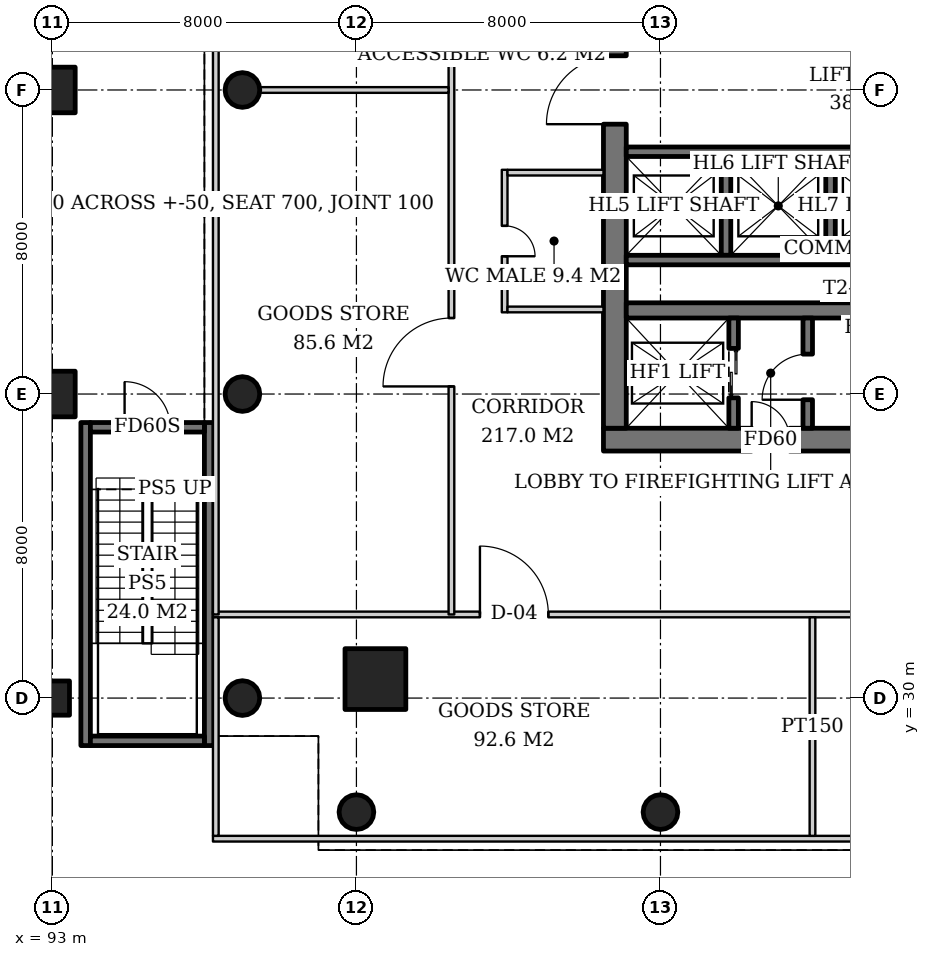
"""IFC4 building model, lengths in metres.
Left out: names, types, materials, properties, quantities, classifications, styles, units other than length and angle.
Written with IfcOpenShell. Run it as: python <this file> out.ifc"""

import sys

from ifc_helpers import new_model, si_unit, direction, frame, frame_2d, origin, origin_2d, place, context, subcontext, project, spatial, rectangle, hollow_circle, extrude, element, fill, save


model = new_model("IFC4")
c1 = context("Model", 3, precision=1e-05, world=origin(), true_north=direction((0.0, 1.0)))
c2 = subcontext(c1, "Body", "Model", "MODEL_VIEW")
j1 = project(units=[si_unit("LENGTHUNIT", "METRE"), si_unit("PLANEANGLEUNIT", "RADIAN")], contexts=[c1])
p1 = place(None, origin())
s1 = spatial("IfcSite", under=j1, at=p1, CompositionType="ELEMENT")
p2 = place(p1, origin())
s2 = spatial("IfcBuilding", under=s1, at=p2, CompositionType="ELEMENT")
p3 = place(p2, frame((0.0, 0.0, 6.0)))
s3 = spatial("IfcBuildingStorey", under=s2, at=p3, CompositionType="ELEMENT", Elevation=6.0)
p4 = place(p3, frame((93.0, 30.0, 0.0), z_axis=(0.0, 0.0, 1.0), x_axis=(1.0, 0.0, 0.0)))
e1 = element("IfcColumn", 1, at=p4, inside=s3, PredefinedType="COLUMN", context=c2, shape_type="SweptSolid", body=[
    extrude(rectangle(XDim=0.9, YDim=0.9, at=origin_2d()), origin(), (0.0, 0.0, 1.0), 5.0),
])
for number, where, z_axis, x_axis in (
    (2, (93.0, 38.0, 0.0), (0.0, 0.0, 1.0), (1.0, 0.0, 0.0)),
    (3, (93.0, 46.0, 0.0), (0.0, 0.0, 1.0), (1.0, 0.0, 0.0)),
):
    element("IfcColumn", number, at=place(p3, frame(where, z_axis=z_axis, x_axis=x_axis)), inside=s3, PredefinedType="COLUMN", context=c2, shape_type="SweptSolid", body=[
        extrude(rectangle(XDim=1.2, YDim=1.2, at=origin_2d()), origin(), (0.0, 0.0, 1.0), 5.0),
    ])
p5 = place(p3, frame((101.5, 30.5, 0.0), z_axis=(0.0, 0.0, 1.0), x_axis=(1.0, 0.0, 0.0)))
e4 = element("IfcColumn", 4, at=p5, inside=s3, PredefinedType="COLUMN", context=c2, shape_type="SweptSolid", body=[
    extrude(rectangle(XDim=1.6, YDim=1.6, at=origin_2d()), origin(), (0.0, 0.0, 1.0), 5.0),
])
for number, where, z_axis, x_axis in (
    (5, (98.0, 30.0, 0.0), (0.0, 0.0, 1.0), (1.0, 0.0, 0.0)),
    (6, (98.0, 46.0, 0.0), (0.0, 0.0, 1.0), (1.0, 0.0, 0.0)),
    (7, (98.0, 38.0, 0.0), (0.0, 0.0, 1.0), (1.0, 0.0, 0.0)),
    (8, (101.0, 27.0, 0.0), (0.0, 0.0, 1.0), (1.0, 0.0, 0.0)),
    (9, (109.0, 27.0, 0.0), (0.0, 0.0, 1.0), (1.0, 0.0, 0.0)),
):
    element("IfcColumn", number, at=place(p3, frame(where, z_axis=z_axis, x_axis=x_axis)), inside=s3, PredefinedType="COLUMN", context=c2, shape_type="SweptSolid", body=[
        extrude(hollow_circle(Radius=0.457, WallThickness=0.03, at=origin_2d()), origin(), (0.0, 0.0, 1.0), 5.0),
    ])
p6 = place(p3, frame((107.5, 36.8, 0.0), z_axis=(0.0, 0.0, 1.0), x_axis=(1.0, 0.0, 0.0)))
e10 = element("IfcWall", 10, at=p6, inside=s3, PredefinedType="SHEAR", context=c2, shape_type="SweptSolid", body=[
    extrude(rectangle(XDim=19.0, YDim=0.6, at=frame_2d((9.5, 0.0))), origin(), (0.0, 0.0, 1.0), 5.0),
])
p7 = place(p6, frame((3.9, 0.0, 0.0)))
e11 = element("IfcOpeningElement", 11, at=p7, cuts=e10, PredefinedType="OPENING", context=c2, shape_type="SweptSolid", body=[
    extrude(rectangle(XDim=1.0, YDim=2.1, at=frame_2d((0.5, 1.05))), frame((0.0, 0.31, 0.0), z_axis=(0.0, -1.0, 0.0), x_axis=(1.0, 0.0, 0.0)), (0.0, 0.0, 1.0), 0.62),
])
p8 = place(p6, frame((14.153, 0.0, 0.0)))
e12 = element("IfcOpeningElement", 12, at=p8, cuts=e10, PredefinedType="OPENING", context=c2, shape_type="SweptSolid", body=[
    extrude(rectangle(XDim=1.0, YDim=2.1, at=frame_2d((0.5, 1.05))), frame((0.0, 0.31, 0.0), z_axis=(0.0, -1.0, 0.0), x_axis=(1.0, 0.0, 0.0)), (0.0, 0.0, 1.0), 0.62),
])
p9 = place(p6, frame((16.2, 0.0, 0.0)))
e13 = element("IfcOpeningElement", 13, at=p9, cuts=e10, PredefinedType="OPENING", context=c2, shape_type="SweptSolid", body=[
    extrude(rectangle(XDim=1.0, YDim=2.1, at=frame_2d((0.5, 1.05))), frame((0.0, 0.31, 0.0), z_axis=(0.0, -1.0, 0.0), x_axis=(1.0, 0.0, 0.0)), (0.0, 0.0, 1.0), 0.62),
])
p10 = place(p3, frame((107.8, 37.1, 0.0), z_axis=(0.0, 0.0, 1.0), x_axis=(0.0, 1.0, 0.0)))
e14 = element("IfcWall", 14, at=p10, inside=s3, PredefinedType="SHEAR", context=c2, shape_type="SweptSolid", body=[
    extrude(rectangle(XDim=17.8, YDim=0.6, at=frame_2d((8.9, 0.0))), origin(), (0.0, 0.0, 1.0), 5.0),
])
p11 = place(p10, frame((8.0, 0.0, 0.0)))
e15 = element("IfcOpeningElement", 15, at=p11, cuts=e14, PredefinedType="OPENING", context=c2, shape_type="SweptSolid", body=[
    extrude(rectangle(XDim=1.8, YDim=2.4, at=frame_2d((0.9, 1.2))), frame((0.0, 0.31, 0.0), z_axis=(0.0, -1.0, 0.0), x_axis=(1.0, 0.0, 0.0)), (0.0, 0.0, 1.0), 0.62),
])
p12 = place(p3, frame((108.1, 40.2, 0.0), z_axis=(0.0, 0.0, 1.0), x_axis=(1.0, 0.0, 0.0)))
e16 = element("IfcWall", 16, at=p12, inside=s3, PredefinedType="SHEAR", context=c2, shape_type="SweptSolid", body=[
    extrude(rectangle(XDim=17.8, YDim=0.4, at=frame_2d((8.9, 0.0))), origin(), (0.0, 0.0, 1.0), 5.0),
])
p13 = place(p3, frame((93.0, 43.0, 3.11), z_axis=(0.0, 0.0, 1.0), x_axis=(1.0, 0.0, 0.0)))
e17 = element("IfcColumn", 17, at=p13, inside=s3, PredefinedType="COLUMN", context=c2, shape_type="SweptSolid", body=[
    extrude(rectangle(XDim=0.3, YDim=0.4, at=origin_2d()), origin(), (0.0, 0.0, 1.0), 1.0),
])
p14 = place(p3, frame((110.925, 37.1, 0.0), z_axis=(0.0, 0.0, 1.0), x_axis=(0.0, 1.0, 0.0)))
e18 = element("IfcWall", 18, at=p14, inside=s3, PredefinedType="SHEAR", context=c2, shape_type="SweptSolid", body=[
    extrude(rectangle(XDim=2.9, YDim=0.25, at=frame_2d((1.45, 0.0))), origin(), (0.0, 0.0, 1.0), 5.0),
])
p15 = place(p14, frame((0.8, 0.0, 0.0)))
e19 = element("IfcOpeningElement", 19, at=p15, cuts=e18, PredefinedType="OPENING", context=c2, shape_type="SweptSolid", body=[
    extrude(rectangle(XDim=1.3, YDim=2.2, at=frame_2d((0.65, 1.1))), frame((0.0, 0.135, 0.0), z_axis=(0.0, -1.0, 0.0), x_axis=(1.0, 0.0, 0.0)), (0.0, 0.0, 1.0), 0.27),
])
p16 = place(p3, frame((112.875, 37.1, 0.0), z_axis=(0.0, 0.0, 1.0), x_axis=(0.0, 1.0, 0.0)))
e20 = element("IfcWall", 20, at=p16, inside=s3, PredefinedType="SHEAR", context=c2, shape_type="SweptSolid", body=[
    extrude(rectangle(XDim=2.9, YDim=0.25, at=frame_2d((1.45, 0.0))), origin(), (0.0, 0.0, 1.0), 5.0),
])
p17 = place(p16, frame((0.75, 0.0, 0.0)))
e21 = element("IfcOpeningElement", 21, at=p17, cuts=e20, PredefinedType="OPENING", context=c2, shape_type="SweptSolid", body=[
    extrude(rectangle(XDim=1.2, YDim=2.1, at=frame_2d((0.6, 1.05))), frame((0.0, 0.135, 0.0), z_axis=(0.0, -1.0, 0.0), x_axis=(1.0, 0.0, 0.0)), (0.0, 0.0, 1.0), 0.27),
])
for number, where, z_axis, x_axis in (
    (22, (110.725, 44.25, 0.0), (0.0, 0.0, 1.0), (0.0, -1.0, 0.0)),
    (23, (113.475, 44.25, 0.0), (0.0, 0.0, 1.0), (0.0, -1.0, 0.0)),
):
    element("IfcWall", number, at=place(p3, frame(where, z_axis=z_axis, x_axis=x_axis)), inside=s3, PredefinedType="SHEAR", context=c2, shape_type="SweptSolid", body=[
        extrude(rectangle(XDim=2.6, YDim=0.25, at=frame_2d((1.3, 0.0))), origin(), (0.0, 0.0, 1.0), 5.0),
    ])
p18 = place(p3, frame((108.1, 41.525, 0.0), z_axis=(0.0, 0.0, 1.0), x_axis=(1.0, 0.0, 0.0)))
e24 = element("IfcWall", 24, at=p18, inside=s3, PredefinedType="SHEAR", context=c2, shape_type="SweptSolid", body=[
    extrude(rectangle(XDim=11.0, YDim=0.25, at=frame_2d((5.5, 0.0))), origin(), (0.0, 0.0, 1.0), 5.0),
])
p19 = place(p3, frame((108.1, 44.375, 0.0), z_axis=(0.0, 0.0, 1.0), x_axis=(1.0, 0.0, 0.0)))
e25 = element("IfcWall", 25, at=p19, inside=s3, PredefinedType="SHEAR", context=c2, shape_type="SweptSolid", body=[
    extrude(rectangle(XDim=12.83, YDim=0.25, at=frame_2d((6.415, 0.0))), origin(), (0.0, 0.0, 1.0), 5.0),
])
p20 = place(p19, frame((9.0, 0.0, 0.0)))
e26 = element("IfcOpeningElement", 26, at=p20, cuts=e25, PredefinedType="OPENING", context=c2, shape_type="SweptSolid", body=[
    extrude(rectangle(XDim=1.0, YDim=2.1, at=frame_2d((0.5, 1.05))), frame((0.0, 0.135, 0.0), z_axis=(0.0, -1.0, 0.0), x_axis=(1.0, 0.0, 0.0)), (0.0, 0.0, 1.0), 0.27),
])
p21 = place(p19, frame((11.515, 0.0, 0.0)))
e27 = element("IfcOpeningElement", 27, at=p21, cuts=e25, PredefinedType="OPENING", context=c2, shape_type="SweptSolid", body=[
    extrude(rectangle(XDim=0.8, YDim=2.0, at=frame_2d((0.4, 1.0))), frame((0.0, 0.135, 0.0), z_axis=(0.0, -1.0, 0.0), x_axis=(1.0, 0.0, 0.0)), (0.0, 0.0, 1.0), 0.27),
])
for number, where, z_axis, x_axis in (
    (28, (93.875, 28.75, 0.0), (0.0, 0.0, 1.0), (0.0, 1.0, 0.0)),
    (29, (97.125, 28.75, 0.0), (0.0, 0.0, 1.0), (0.0, 1.0, 0.0)),
):
    element("IfcWall", number, at=place(p3, frame(where, z_axis=z_axis, x_axis=x_axis)), inside=s3, PredefinedType="SOLIDWALL", context=c2, shape_type="SweptSolid", body=[
        extrude(rectangle(XDim=8.5, YDim=0.25, at=frame_2d((4.25, 0.0))), origin(), (0.0, 0.0, 1.0), 4.7),
    ])
p22 = place(p3, frame((94.0, 28.875, 0.0), z_axis=(0.0, 0.0, 1.0), x_axis=(1.0, 0.0, 0.0)))
e30 = element("IfcWall", 30, at=p22, inside=s3, PredefinedType="SOLIDWALL", context=c2, shape_type="SweptSolid", body=[
    extrude(rectangle(XDim=3.0, YDim=0.25, at=frame_2d((1.5, 0.0))), origin(), (0.0, 0.0, 1.0), 4.7),
])
p23 = place(p3, frame((94.0, 37.125, 0.0), z_axis=(0.0, 0.0, 1.0), x_axis=(1.0, 0.0, 0.0)))
e31 = element("IfcWall", 31, at=p23, inside=s3, PredefinedType="SOLIDWALL", context=c2, shape_type="SweptSolid", body=[
    extrude(rectangle(XDim=3.0, YDim=0.25, at=frame_2d((1.5, 0.0))), origin(), (0.0, 0.0, 1.0), 4.7),
])
p24 = place(p23, frame((0.9, 0.0, 0.0)))
e32 = element("IfcOpeningElement", 32, at=p24, cuts=e31, PredefinedType="OPENING", context=c2, shape_type="SweptSolid", body=[
    extrude(rectangle(XDim=1.2, YDim=2.1, at=frame_2d((0.6, 1.05))), frame((0.0, 0.135, 0.0), z_axis=(0.0, -1.0, 0.0), x_axis=(1.0, 0.0, 0.0)), (0.0, 0.0, 1.0), 0.27),
])
p25 = place(p3, frame((104.9, 43.9, 0.0), z_axis=(0.0, 0.0, 1.0), x_axis=(0.0, -1.0, 0.0)))
e33 = element("IfcWall", 33, at=p25, inside=s3, PredefinedType="PARTITIONING", context=c2, shape_type="SweptSolid", body=[
    extrude(rectangle(XDim=3.75, YDim=0.15, at=frame_2d((1.875, 0.0))), origin(), (0.0, 0.0, 1.0), 3.947),
])
p26 = place(p25, frame((1.475, 0.0, 0.0)))
e34 = element("IfcOpeningElement", 34, at=p26, cuts=e33, PredefinedType="OPENING", context=c2, shape_type="SweptSolid", body=[
    extrude(rectangle(XDim=0.8, YDim=2.1, at=frame_2d((0.4, 1.05))), frame((0.0, 0.085, 0.0), z_axis=(0.0, -1.0, 0.0), x_axis=(1.0, 0.0, 0.0)), (0.0, 0.0, 1.0), 0.17),
])
for number, where, z_axis, x_axis in (
    (35, (104.975, 43.825, 0.0), (0.0, 0.0, 1.0), (1.0, 0.0, 0.0)),
    (36, (104.975, 40.225, 0.0), (0.0, 0.0, 1.0), (1.0, 0.0, 0.0)),
):
    element("IfcWall", number, at=place(p3, frame(where, z_axis=z_axis, x_axis=x_axis)), inside=s3, PredefinedType="PARTITIONING", context=c2, shape_type="SweptSolid", body=[
        extrude(rectangle(XDim=2.525, YDim=0.15, at=frame_2d((1.262, 0.0))), origin(), (0.0, 0.0, 1.0), 4.7),
    ])
p27 = place(p3, frame((97.225, 26.3, 0.0), z_axis=(0.0, 0.0, 1.0), x_axis=(1.0, 0.0, 0.0)))
e37 = element("IfcWall", 37, at=p27, inside=s3, PredefinedType="PARTITIONING", context=c2, shape_type="SweptSolid", body=[
    extrude(rectangle(XDim=39.55, YDim=0.15, at=frame_2d((19.775, 0.0))), origin(), (0.0, 0.0, 1.0), 4.7),
])
p28 = place(p3, frame((97.225, 32.2, 0.0), z_axis=(0.0, 0.0, 1.0), x_axis=(1.0, 0.0, 0.0)))
e38 = element("IfcWall", 38, at=p28, inside=s3, PredefinedType="PARTITIONING", context=c2, shape_type="SweptSolid", body=[
    extrude(rectangle(XDim=39.55, YDim=0.15, at=frame_2d((19.775, 0.0))), origin(), (0.0, 0.0, 1.0), 3.9),
])
p29 = place(p28, frame((7.025, 0.0, 0.0)))
e39 = element("IfcOpeningElement", 39, at=p29, cuts=e38, PredefinedType="OPENING", context=c2, shape_type="SweptSolid", body=[
    extrude(rectangle(XDim=1.8, YDim=2.4, at=frame_2d((0.9, 1.2))), frame((0.0, 0.085, 0.0), z_axis=(0.0, -1.0, 0.0), x_axis=(1.0, 0.0, 0.0)), (0.0, 0.0, 1.0), 0.17),
])
p30 = place(p28, frame((18.875, 0.0, 0.0)))
e40 = element("IfcOpeningElement", 40, at=p30, cuts=e38, PredefinedType="OPENING", context=c2, shape_type="SweptSolid", body=[
    extrude(rectangle(XDim=1.8, YDim=2.4, at=frame_2d((0.9, 1.2))), frame((0.0, 0.085, 0.0), z_axis=(0.0, -1.0, 0.0), x_axis=(1.0, 0.0, 0.0)), (0.0, 0.0, 1.0), 0.17),
])
p31 = place(p28, frame((30.725, 0.0, 0.0)))
e41 = element("IfcOpeningElement", 41, at=p31, cuts=e38, PredefinedType="OPENING", context=c2, shape_type="SweptSolid", body=[
    extrude(rectangle(XDim=1.8, YDim=2.4, at=frame_2d((0.9, 1.2))), frame((0.0, 0.085, 0.0), z_axis=(0.0, -1.0, 0.0), x_axis=(1.0, 0.0, 0.0)), (0.0, 0.0, 1.0), 0.17),
])
p32 = place(p3, frame((97.3, 26.375, 0.0), z_axis=(0.0, 0.0, 1.0), x_axis=(0.0, 1.0, 0.0)))
e42 = element("IfcWall", 42, at=p32, inside=s3, PredefinedType="PARTITIONING", context=c2, shape_type="SweptSolid", body=[
    extrude(rectangle(XDim=5.75, YDim=0.15, at=frame_2d((2.875, 0.0))), origin(), (0.0, 0.0, 1.0), 4.7),
])
p33 = place(p3, frame((113.0, 26.375, 0.0), z_axis=(0.0, 0.0, 1.0), x_axis=(0.0, 1.0, 0.0)))
e43 = element("IfcWall", 43, at=p33, inside=s3, PredefinedType="PARTITIONING", context=c2, shape_type="SweptSolid", body=[
    extrude(rectangle(XDim=5.75, YDim=0.15, at=frame_2d((2.875, 0.0))), origin(), (0.0, 0.0, 1.0), 4.15),
])
p34 = place(p3, frame((97.3, 32.2, 0.0), z_axis=(0.0, 0.0, 1.0), x_axis=(0.0, 1.0, 0.0)))
e44 = element("IfcWall", 44, at=p34, inside=s3, PredefinedType="PARTITIONING", context=c2, shape_type="SweptSolid", body=[
    extrude(rectangle(XDim=27.6, YDim=0.15, at=frame_2d((13.8, 0.0))), origin(), (0.0, 0.0, 1.0), 4.7),
])
p35 = place(p3, frame((103.5, 32.2, 0.0), z_axis=(0.0, 0.0, 1.0), x_axis=(0.0, 1.0, 0.0)))
e45 = element("IfcWall", 45, at=p35, inside=s3, PredefinedType="PARTITIONING", context=c2, shape_type="SweptSolid", body=[
    extrude(rectangle(XDim=27.6, YDim=0.15, at=frame_2d((13.8, 0.0))), origin(), (0.0, 0.0, 1.0), 3.9),
])
p36 = place(p35, frame((6.0, 0.0, 0.0)))
e46 = element("IfcOpeningElement", 46, at=p36, cuts=e45, PredefinedType="OPENING", context=c2, shape_type="SweptSolid", body=[
    extrude(rectangle(XDim=1.8, YDim=2.4, at=frame_2d((0.9, 1.2))), frame((0.0, 0.085, 0.0), z_axis=(0.0, -1.0, 0.0), x_axis=(1.0, 0.0, 0.0)), (0.0, 0.0, 1.0), 0.17),
])
p37 = place(p35, frame((19.8, 0.0, 0.0)))
e47 = element("IfcOpeningElement", 47, at=p37, cuts=e45, PredefinedType="OPENING", context=c2, shape_type="SweptSolid", body=[
    extrude(rectangle(XDim=1.8, YDim=2.4, at=frame_2d((0.9, 1.2))), frame((0.0, 0.085, 0.0), z_axis=(0.0, -1.0, 0.0), x_axis=(1.0, 0.0, 0.0)), (0.0, 0.0, 1.0), 0.17),
])
p38 = place(p3, frame((98.457, 46.0, 0.0), z_axis=(0.0, 0.0, 1.0), x_axis=(1.0, 0.0, 0.0)))
e48 = element("IfcWall", 48, at=p38, inside=s3, PredefinedType="PARTITIONING", context=c2, shape_type="SweptSolid", body=[
    extrude(rectangle(XDim=4.968, YDim=0.15, at=frame_2d((2.484, 0.0))), origin(), (0.0, 0.0, 1.0), 4.7),
])
p39 = place(p15, origin())
e49 = element("IfcDoor", 49, at=p39, inside=s3, OperationType="DOUBLE_DOOR_SLIDING", PredefinedType="DOOR", context=c2, shape_type="SweptSolid", body=[
    extrude(rectangle(XDim=1.3, YDim=2.2, at=frame_2d((0.65, 1.1))), frame((0.0, 0.025, 0.0), z_axis=(0.0, -1.0, 0.0), x_axis=(1.0, 0.0, 0.0)), (0.0, 0.0, 1.0), 0.05),
])
fill(e19, e49)
p40 = place(p17, origin())
e50 = element("IfcDoor", 50, at=p40, inside=s3, OperationType="SINGLE_SWING_LEFT", PredefinedType="DOOR", context=c2, shape_type="SweptSolid", body=[
    extrude(rectangle(XDim=1.2, YDim=2.1, at=frame_2d((0.6, 1.05))), frame((0.0, 0.025, 0.0), z_axis=(0.0, -1.0, 0.0), x_axis=(1.0, 0.0, 0.0)), (0.0, 0.0, 1.0), 0.05),
])
fill(e21, e50)
p41 = place(p7, origin())
e51 = element("IfcDoor", 51, at=p41, inside=s3, OperationType="SINGLE_SWING_LEFT", PredefinedType="DOOR", context=c2, shape_type="SweptSolid", body=[
    extrude(rectangle(XDim=1.0, YDim=2.1, at=frame_2d((0.5, 1.05))), frame((0.0, 0.025, 0.0), z_axis=(0.0, -1.0, 0.0), x_axis=(1.0, 0.0, 0.0)), (0.0, 0.0, 1.0), 0.05),
])
fill(e11, e51)
p42 = place(p11, origin())
e52 = element("IfcDoor", 52, at=p42, inside=s3, OperationType="DOUBLE_DOOR_SINGLE_SWING", PredefinedType="DOOR", context=c2, shape_type="SweptSolid", body=[
    extrude(rectangle(XDim=1.8, YDim=2.4, at=frame_2d((0.9, 1.2))), frame((0.0, 0.025, 0.0), z_axis=(0.0, -1.0, 0.0), x_axis=(1.0, 0.0, 0.0)), (0.0, 0.0, 1.0), 0.05),
])
fill(e15, e52)
p43 = place(p24, origin())
e53 = element("IfcDoor", 53, at=p43, inside=s3, OperationType="SINGLE_SWING_LEFT", PredefinedType="DOOR", context=c2, shape_type="SweptSolid", body=[
    extrude(rectangle(XDim=1.2, YDim=2.1, at=frame_2d((0.6, 1.05))), frame((0.0, 0.025, 0.0), z_axis=(0.0, -1.0, 0.0), x_axis=(1.0, 0.0, 0.0)), (0.0, 0.0, 1.0), 0.05),
])
fill(e32, e53)
p44 = place(p26, origin())
e54 = element("IfcDoor", 54, at=p44, inside=s3, OperationType="SINGLE_SWING_RIGHT", PredefinedType="DOOR", context=c2, shape_type="SweptSolid", body=[
    extrude(rectangle(XDim=0.8, YDim=2.1, at=frame_2d((0.4, 1.05))), frame((0.0, 0.025, 0.0), z_axis=(0.0, -1.0, 0.0), x_axis=(1.0, 0.0, 0.0)), (0.0, 0.0, 1.0), 0.05),
])
fill(e34, e54)
p45 = place(p29, origin())
e55 = element("IfcDoor", 55, at=p45, inside=s3, OperationType="DOUBLE_DOOR_SINGLE_SWING", PredefinedType="DOOR", context=c2, shape_type="SweptSolid", body=[
    extrude(rectangle(XDim=1.8, YDim=2.4, at=frame_2d((0.9, 1.2))), frame((0.0, 0.025, 0.0), z_axis=(0.0, -1.0, 0.0), x_axis=(1.0, 0.0, 0.0)), (0.0, 0.0, 1.0), 0.05),
])
fill(e39, e55)
p46 = place(p36, origin())
e56 = element("IfcDoor", 56, at=p46, inside=s3, OperationType="DOUBLE_DOOR_SINGLE_SWING", PredefinedType="DOOR", context=c2, shape_type="SweptSolid", body=[
    extrude(rectangle(XDim=1.8, YDim=2.4, at=frame_2d((0.9, 1.2))), frame((0.0, 0.025, 0.0), z_axis=(0.0, -1.0, 0.0), x_axis=(1.0, 0.0, 0.0)), (0.0, 0.0, 1.0), 0.05),
])
fill(e46, e56)
save(model, sys.argv[1])
